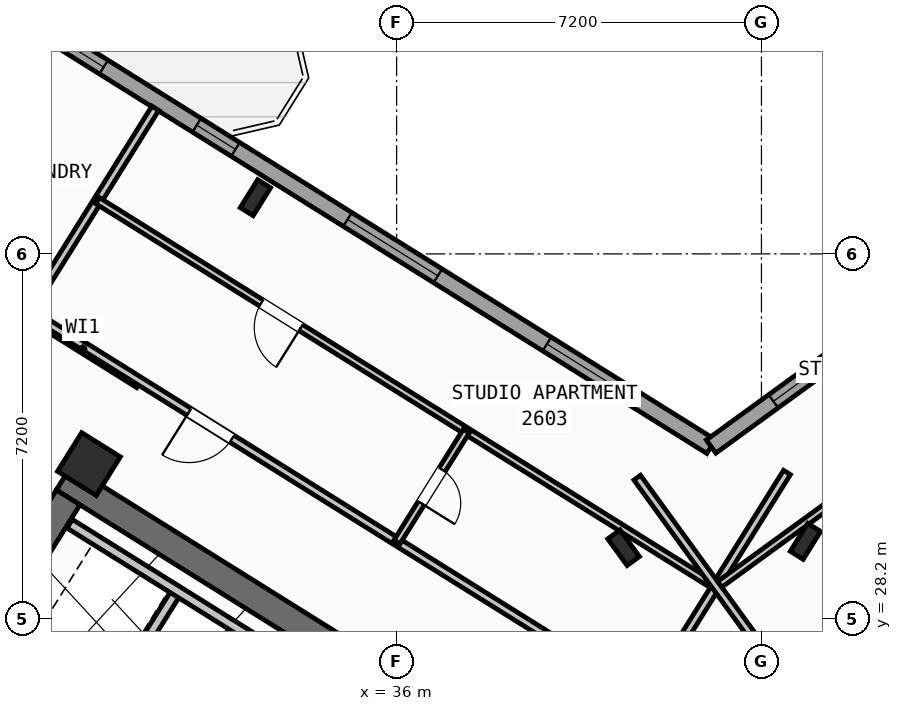
"""IFC4 building model, lengths in metres.
Left out: names, types, materials, properties, quantities, classifications, styles, units other than length and angle.
Written with IfcOpenShell. Run it as: python <this file> out.ifc"""

import sys

from ifc_helpers import new_model, si_unit, direction, frame, frame_2d, origin, origin_2d, place, context, subcontext, project, spatial, rectangle, hollow_rectangle, i_section, extrude, source, transform, mapped, element, fill, save


model = new_model("IFC4")
c1 = context("Model", 3, precision=1e-05, world=origin(), true_north=direction((0.0, 1.0)))
c2 = subcontext(c1, "Body", "Model", "MODEL_VIEW")
j1 = project(units=[si_unit("LENGTHUNIT", "METRE"), si_unit("PLANEANGLEUNIT", "RADIAN")], contexts=[c1])
p1 = place(None, origin())
s1 = spatial("IfcSite", under=j1, at=p1, CompositionType="ELEMENT")
p2 = place(p1, origin())
s2 = spatial("IfcBuilding", under=s1, at=p2, CompositionType="ELEMENT")
p3 = place(p2, frame((0.0, 0.0, 105.3)))
s3 = spatial("IfcBuildingStorey", under=s2, at=p3, CompositionType="ELEMENT", Elevation=105.3)
p4 = place(p3, frame((40.573, 24.01, 0.0), z_axis=(0.0, 0.0, 1.0), x_axis=(-0.848047359947, 0.529920442413, 0.0)))
e1 = element("IfcWall", 1, at=p4, inside=s3, PredefinedType="SHEAR", context=c2, shape_type="SweptSolid", body=[
    extrude(rectangle(XDim=13.14, YDim=0.55, at=frame_2d((6.57, 0.0))), origin(), (0.0, 0.0, 1.0), 3.35),
])
p5 = place(p3, frame((29.517, 30.594, 0.0), z_axis=(0.0, 0.0, 1.0), x_axis=(-0.529906864564, -0.848055844204, 0.0)))
e2 = element("IfcWall", 2, at=p5, inside=s3, PredefinedType="SHEAR", context=c2, shape_type="SweptSolid", body=[
    extrude(rectangle(XDim=3.575, YDim=0.55, at=frame_2d((1.788, 0.0))), origin(), (0.0, 0.0, 1.0), 3.35),
])
p6 = place(p3, frame((44.365, 24.142, 0.0), z_axis=(0.0, 0.0, 1.0), x_axis=(0.809024304885, 0.587775190107, 0.0)))
e3 = element("IfcWall", 3, at=p6, inside=s3, PredefinedType="SHEAR", context=c2, shape_type="SweptSolid", body=[
    extrude(rectangle(XDim=12.34, YDim=0.55, at=frame_2d((6.17, 0.0))), origin(), (0.0, 0.0, 1.0), 3.35),
])
m1 = source(origin(), c2, "Body", "SweptSolid", [
    extrude(i_section(OverallWidth=0.3, OverallDepth=0.65, WebThickness=0.016, FlangeThickness=0.031, at=origin_2d()), origin(), (0.0, 0.0, 1.0), 3.6),
])
for number, where, z_axis, x_axis in (
    (4, (44.068, 29.726, 0.0), (0.0, 0.0, 1.0), (-0.848, 0.53, 0.0)),
    (5, (33.213, 36.509, 0.0), (0.0, 0.0, 1.0), (-0.848, 0.53, 0.0)),
):
    element("IfcColumn", number, at=place(p3, frame(where, z_axis=z_axis, x_axis=x_axis)), inside=s3, PredefinedType="COLUMN", context=c2, shape_type="MappedRepresentation", body=[
        mapped(m1, transform((0.0, 0.0, 0.0), scale=1.0)),
    ])
m2 = source(origin(), c2, "Body", "SweptSolid", [
    extrude(hollow_rectangle(XDim=0.9, YDim=0.9, WallThickness=0.036, at=origin_2d()), origin(), (0.0, 0.0, 1.0), 3.6),
])
p7 = place(p3, frame((29.928, 31.251, 0.0), z_axis=(0.0, 0.0, 1.0), x_axis=(-0.848048096156, 0.529919264233, 0.0)))
e6 = element("IfcColumn", 6, at=p7, inside=s3, PredefinedType="COLUMN", context=c2, shape_type="MappedRepresentation", body=[
    mapped(m2, transform((0.0, 0.0, 0.0), scale=1.0)),
])
p8 = place(p3, frame((40.479, 29.601, 0.0), z_axis=(0.0, 0.0, 1.0), x_axis=(0.809016994375, 0.587785252292, 0.0)))
e7 = element("IfcColumn", 7, at=p8, inside=s3, PredefinedType="COLUMN", context=c2, shape_type="MappedRepresentation", body=[
    mapped(m1, transform((0.0, 0.0, 0.0), scale=1.0)),
])
p9 = place(p3, frame((31.76, 12.183, 0.0), z_axis=(0.0, 0.0, 1.0), x_axis=(-0.848047074256, 0.529920899612, 0.0)))
e8 = element("IfcWall", 8, at=p9, inside=s3, PredefinedType="STANDARD", context=c2, shape_type="SweptSolid", body=[
    extrude(rectangle(XDim=30.652, YDim=0.32, at=frame_2d((15.326, 0.0))), origin(), (0.0, 0.0, 1.0), 3.35),
])
p10 = place(p9, frame((15.153, 0.0, 0.0)))
e9 = element("IfcOpeningElement", 9, at=p10, cuts=e8, PredefinedType="OPENING", context=c2, shape_type="SweptSolid", body=[
    extrude(rectangle(XDim=1.2, YDim=2.15, at=frame_2d((0.6, 1.075))), frame((0.0, 0.17, 0.0), z_axis=(0.0, -1.0, 0.0), x_axis=(1.0, 0.0, 0.0)), (0.0, 0.0, 1.0), 0.34),
])
p11 = place(p9, frame((2.002, 0.0, 0.8)))
e10 = element("IfcOpeningElement", 10, at=p11, cuts=e8, PredefinedType="OPENING", context=c2, shape_type="SweptSolid", body=[
    extrude(rectangle(XDim=2.1, YDim=1.55, at=frame_2d((1.05, 0.775))), frame((0.0, 0.17, 0.0), z_axis=(0.0, -1.0, 0.0), x_axis=(1.0, 0.0, 0.0)), (0.0, 0.0, 1.0), 0.34),
])
p12 = place(p9, frame((7.206, 0.0, 0.8)))
e11 = element("IfcOpeningElement", 11, at=p12, cuts=e8, PredefinedType="OPENING", context=c2, shape_type="SweptSolid", body=[
    extrude(rectangle(XDim=2.1, YDim=1.55, at=frame_2d((1.05, 0.775))), frame((0.0, 0.17, 0.0), z_axis=(0.0, -1.0, 0.0), x_axis=(1.0, 0.0, 0.0)), (0.0, 0.0, 1.0), 0.34),
])
p13 = place(p9, frame((12.648, 0.0, 1.0)))
e12 = element("IfcOpeningElement", 12, at=p13, cuts=e8, PredefinedType="OPENING", context=c2, shape_type="SweptSolid", body=[
    extrude(rectangle(XDim=0.9, YDim=1.25, at=frame_2d((0.45, 0.625))), frame((0.0, 0.17, 0.0), z_axis=(0.0, -1.0, 0.0), x_axis=(1.0, 0.0, 0.0)), (0.0, 0.0, 1.0), 0.34),
])
p14 = place(p9, frame((20.628, 0.0, 0.95)))
e13 = element("IfcOpeningElement", 13, at=p14, cuts=e8, PredefinedType="OPENING", context=c2, shape_type="SweptSolid", body=[
    extrude(rectangle(XDim=1.2, YDim=1.4, at=frame_2d((0.6, 0.7))), frame((0.0, 0.17, 0.0), z_axis=(0.0, -1.0, 0.0), x_axis=(1.0, 0.0, 0.0)), (0.0, 0.0, 1.0), 0.34),
])
p15 = place(p9, frame((26.008, 0.0, 1.0)))
e14 = element("IfcOpeningElement", 14, at=p15, cuts=e8, PredefinedType="OPENING", context=c2, shape_type="SweptSolid", body=[
    extrude(rectangle(XDim=0.9, YDim=1.25, at=frame_2d((0.45, 0.625))), frame((0.0, 0.17, 0.0), z_axis=(0.0, -1.0, 0.0), x_axis=(1.0, 0.0, 0.0)), (0.0, 0.0, 1.0), 0.34),
])
p16 = place(p9, frame((28.408, 0.0, 1.0)))
e15 = element("IfcOpeningElement", 15, at=p16, cuts=e8, PredefinedType="OPENING", context=c2, shape_type="SweptSolid", body=[
    extrude(rectangle(XDim=0.9, YDim=1.25, at=frame_2d((0.45, 0.625))), frame((0.0, 0.17, 0.0), z_axis=(0.0, -1.0, 0.0), x_axis=(1.0, 0.0, 0.0)), (0.0, 0.0, 1.0), 0.34),
])
p17 = place(p3, frame((17.424, 47.083, 0.0), z_axis=(0.0, 0.0, 1.0), x_axis=(0.848049927979, -0.529916332693, 0.0)))
e16 = element("IfcWall", 16, at=p17, inside=s3, PredefinedType="STANDARD", context=c2, shape_type="SweptSolid", body=[
    extrude(rectangle(XDim=29.223, YDim=0.32, at=frame_2d((14.612, 0.0))), origin(), (0.0, 0.0, 1.0), 3.35),
])
p18 = place(p17, frame((3.709, 0.0, 0.0)))
e17 = element("IfcOpeningElement", 17, at=p18, cuts=e16, PredefinedType="OPENING", context=c2, shape_type="SweptSolid", body=[
    extrude(rectangle(XDim=1.05, YDim=2.15, at=frame_2d((0.525, 1.075))), frame((0.0, 0.17, 0.0), z_axis=(0.0, -1.0, 0.0), x_axis=(1.0, 0.0, 0.0)), (0.0, 0.0, 1.0), 0.34),
])
p19 = place(p17, frame((0.659, 0.0, 0.95)))
e18 = element("IfcOpeningElement", 18, at=p19, cuts=e16, PredefinedType="OPENING", context=c2, shape_type="SweptSolid", body=[
    extrude(rectangle(XDim=1.2, YDim=1.4, at=frame_2d((0.6, 0.7))), frame((0.0, 0.17, 0.0), z_axis=(0.0, -1.0, 0.0), x_axis=(1.0, 0.0, 0.0)), (0.0, 0.0, 1.0), 0.34),
])
p20 = place(p17, frame((6.972, 0.0, 1.0)))
e19 = element("IfcOpeningElement", 19, at=p20, cuts=e16, PredefinedType="OPENING", context=c2, shape_type="SweptSolid", body=[
    extrude(rectangle(XDim=0.9, YDim=1.25, at=frame_2d((0.45, 0.625))), frame((0.0, 0.17, 0.0), z_axis=(0.0, -1.0, 0.0), x_axis=(1.0, 0.0, 0.0)), (0.0, 0.0, 1.0), 0.34),
])
p21 = place(p17, frame((9.847, 0.0, 0.85)))
e20 = element("IfcOpeningElement", 20, at=p21, cuts=e16, PredefinedType="OPENING", context=c2, shape_type="SweptSolid", body=[
    extrude(rectangle(XDim=1.5, YDim=1.5, at=frame_2d((0.75, 0.75))), frame((0.0, 0.17, 0.0), z_axis=(0.0, -1.0, 0.0), x_axis=(1.0, 0.0, 0.0)), (0.0, 0.0, 1.0), 0.34),
])
p22 = place(p17, frame((13.889, 0.0, 0.95)))
e21 = element("IfcOpeningElement", 21, at=p22, cuts=e16, PredefinedType="OPENING", context=c2, shape_type="SweptSolid", body=[
    extrude(rectangle(XDim=1.2, YDim=1.4, at=frame_2d((0.6, 0.7))), frame((0.0, 0.17, 0.0), z_axis=(0.0, -1.0, 0.0), x_axis=(1.0, 0.0, 0.0)), (0.0, 0.0, 1.0), 0.34),
])
p23 = place(p17, frame((17.254, 0.0, 1.0)))
e22 = element("IfcOpeningElement", 22, at=p23, cuts=e16, PredefinedType="OPENING", context=c2, shape_type="SweptSolid", body=[
    extrude(rectangle(XDim=0.9, YDim=1.25, at=frame_2d((0.45, 0.625))), frame((0.0, 0.17, 0.0), z_axis=(0.0, -1.0, 0.0), x_axis=(1.0, 0.0, 0.0)), (0.0, 0.0, 1.0), 0.34),
])
p24 = place(p17, frame((20.764, 0.0, 0.8)))
e23 = element("IfcOpeningElement", 23, at=p24, cuts=e16, PredefinedType="OPENING", context=c2, shape_type="SweptSolid", body=[
    extrude(rectangle(XDim=2.1, YDim=1.55, at=frame_2d((1.05, 0.775))), frame((0.0, 0.17, 0.0), z_axis=(0.0, -1.0, 0.0), x_axis=(1.0, 0.0, 0.0)), (0.0, 0.0, 1.0), 0.34),
])
p25 = place(p17, frame((25.403, 0.0, 0.8)))
e24 = element("IfcOpeningElement", 24, at=p25, cuts=e16, PredefinedType="OPENING", context=c2, shape_type="SweptSolid", body=[
    extrude(rectangle(XDim=2.1, YDim=1.55, at=frame_2d((1.05, 0.775))), frame((0.0, 0.17, 0.0), z_axis=(0.0, -1.0, 0.0), x_axis=(1.0, 0.0, 0.0)), (0.0, 0.0, 1.0), 0.34),
])
p26 = place(p3, frame((42.207, 31.597, 0.0), z_axis=(0.0, 0.0, 1.0), x_axis=(0.809020333377, 0.587780656523, 0.0)))
e25 = element("IfcWall", 25, at=p26, inside=s3, PredefinedType="STANDARD", context=c2, shape_type="SweptSolid", body=[
    extrude(rectangle(XDim=15.223, YDim=0.32, at=frame_2d((7.611, 0.0))), origin(), (0.0, 0.0, 1.0), 3.35),
])
p27 = place(p26, frame((12.82, 0.0, 0.0)))
e26 = element("IfcOpeningElement", 26, at=p27, cuts=e25, PredefinedType="OPENING", context=c2, shape_type="SweptSolid", body=[
    extrude(rectangle(XDim=1.05, YDim=2.15, at=frame_2d((0.525, 1.075))), frame((0.0, 0.17, 0.0), z_axis=(0.0, -1.0, 0.0), x_axis=(1.0, 0.0, 0.0)), (0.0, 0.0, 1.0), 0.34),
])
p28 = place(p26, frame((1.52, 0.0, 0.8)))
e27 = element("IfcOpeningElement", 27, at=p28, cuts=e25, PredefinedType="OPENING", context=c2, shape_type="SweptSolid", body=[
    extrude(rectangle(XDim=2.1, YDim=1.55, at=frame_2d((1.05, 0.775))), frame((0.0, 0.17, 0.0), z_axis=(0.0, -1.0, 0.0), x_axis=(1.0, 0.0, 0.0)), (0.0, 0.0, 1.0), 0.34),
])
p29 = place(p26, frame((5.76, 0.0, 0.8)))
e28 = element("IfcOpeningElement", 28, at=p29, cuts=e25, PredefinedType="OPENING", context=c2, shape_type="SweptSolid", body=[
    extrude(rectangle(XDim=2.1, YDim=1.55, at=frame_2d((1.05, 0.775))), frame((0.0, 0.17, 0.0), z_axis=(0.0, -1.0, 0.0), x_axis=(1.0, 0.0, 0.0)), (0.0, 0.0, 1.0), 0.34),
])
p30 = place(p26, frame((10.219, 0.0, 1.0)))
e29 = element("IfcOpeningElement", 29, at=p30, cuts=e25, PredefinedType="OPENING", context=c2, shape_type="SweptSolid", body=[
    extrude(rectangle(XDim=0.9, YDim=1.25, at=frame_2d((0.45, 0.625))), frame((0.0, 0.17, 0.0), z_axis=(0.0, -1.0, 0.0), x_axis=(1.0, 0.0, 0.0)), (0.0, 0.0, 1.0), 0.34),
])
p31 = place(p3, frame((31.645, 28.716, 0.0), z_axis=(0.0, 0.0, 1.0), x_axis=(-0.52986693015, -0.848080795876, 0.0)))
e30 = element("IfcWall", 30, at=p31, inside=s3, PredefinedType="STANDARD", context=c2, shape_type="SweptSolid", body=[
    extrude(rectangle(XDim=2.66, YDim=0.2, at=frame_2d((1.33, 0.0))), origin(), (0.0, 0.0, 1.0), 3.34),
])
p32 = place(p3, frame((33.363, 27.69, 0.0), z_axis=(0.0, 0.0, 1.0), x_axis=(-0.848047090064, 0.529920874315, 0.0)))
e31 = element("IfcWall", 31, at=p32, inside=s3, PredefinedType="STANDARD", context=c2, shape_type="SweptSolid", body=[
    extrude(rectangle(XDim=4.498, YDim=0.2, at=frame_2d((2.249, 0.0))), origin(), (0.0, 0.0, 1.0), 3.34),
])
p33 = place(p3, frame((30.914, 32.829, 0.0), z_axis=(0.0, 0.0, 1.0), x_axis=(-0.848008813643, 0.529982124211, 0.0)))
e32 = element("IfcWall", 32, at=p33, inside=s3, PredefinedType="PARTITIONING", context=c2, shape_type="SweptSolid", body=[
    extrude(rectangle(XDim=2.61, YDim=0.16, at=frame_2d((1.305, 0.0))), origin(), (0.0, 0.0, 1.0), 3.34),
])
p34 = place(p3, frame((31.239, 38.274, 0.0), z_axis=(0.0, 0.0, 1.0), x_axis=(-0.529918119251, -0.84804881162, 0.0)))
e33 = element("IfcWall", 33, at=p34, inside=s3, PredefinedType="PARTITIONING", context=c2, shape_type="SweptSolid", body=[
    extrude(rectangle(XDim=17.65, YDim=0.16, at=frame_2d((8.825, 0.0))), origin(), (0.0, 0.0, 1.0), 3.34),
])
p35 = place(p3, frame((41.936, 26.012, 0.0), z_axis=(0.0, 0.0, 1.0), x_axis=(-0.848051154596, 0.529914369676, 0.0)))
e34 = element("IfcWall", 34, at=p35, inside=s3, PredefinedType="PARTITIONING", context=c2, shape_type="SweptSolid", body=[
    extrude(rectangle(XDim=15.57, YDim=0.16, at=frame_2d((7.785, 0.0))), origin(), (0.0, 0.0, 1.0), 3.34),
])
p36 = place(p35, frame((10.83, 0.0, 0.0)))
e35 = element("IfcOpeningElement", 35, at=p36, cuts=e34, PredefinedType="OPENING", context=c2, shape_type="SweptSolid", body=[
    extrude(rectangle(XDim=1.0, YDim=2.1, at=frame_2d((0.5, 1.05))), frame((0.0, 0.09, 0.0), z_axis=(0.0, -1.0, 0.0), x_axis=(1.0, 0.0, 0.0)), (0.0, 0.0, 1.0), 0.18),
])
p37 = place(p3, frame((43.704, 31.086, 0.0), z_axis=(0.0, 0.0, 1.0), x_axis=(-0.529906828443, -0.848055866774, 0.0)))
e36 = element("IfcWall", 36, at=p37, inside=s3, PredefinedType="PARTITIONING", context=c2, shape_type="SweptSolid", body=[
    extrude(rectangle(XDim=5.48, YDim=0.16, at=frame_2d((2.74, 0.0))), origin(), (0.0, 0.0, 1.0), 3.34),
])
p38 = place(p3, frame((42.226, 28.873, 0.0), z_axis=(0.0, 0.0, 1.0), x_axis=(-0.848049134363, 0.529917602752, 0.0)))
e37 = element("IfcWall", 37, at=p38, inside=s3, PredefinedType="PLUMBINGWALL", context=c2, shape_type="SweptSolid", body=[
    extrude(rectangle(XDim=14.3, YDim=0.14, at=frame_2d((7.15, 0.0))), origin(), (0.0, 0.0, 1.0), 3.34),
])
p39 = place(p38, frame((9.57, 0.0, 0.0)))
e38 = element("IfcOpeningElement", 38, at=p39, cuts=e37, PredefinedType="OPENING", context=c2, shape_type="SweptSolid", body=[
    extrude(rectangle(XDim=0.92, YDim=2.08, at=frame_2d((0.46, 1.04))), frame((0.0, 0.08, 0.0), z_axis=(0.0, -1.0, 0.0), x_axis=(1.0, 0.0, 0.0)), (0.0, 0.0, 1.0), 0.16),
])
p40 = place(p3, frame((37.375, 31.904, 0.0), z_axis=(0.0, 0.0, 1.0), x_axis=(-0.529913878929, -0.848051461244, 0.0)))
e39 = element("IfcWall", 39, at=p40, inside=s3, PredefinedType="PLUMBINGWALL", context=c2, shape_type="SweptSolid", body=[
    extrude(rectangle(XDim=2.58, YDim=0.14, at=frame_2d((1.29, 0.0))), origin(), (0.0, 0.0, 1.0), 3.34),
])
p41 = place(p40, frame((0.9, 0.0, 0.0)))
e40 = element("IfcOpeningElement", 40, at=p41, cuts=e39, PredefinedType="OPENING", context=c2, shape_type="SweptSolid", body=[
    extrude(rectangle(XDim=0.78, YDim=2.05, at=frame_2d((0.39, 1.025))), frame((0.0, 0.08, 0.0), z_axis=(0.0, -1.0, 0.0), x_axis=(1.0, 0.0, 0.0)), (0.0, 0.0, 1.0), 0.16),
])
p42 = place(p3, frame((42.866, 26.044, 0.0), z_axis=(0.0, 0.0, 1.0), x_axis=(0.809020254154, 0.587780765566, 0.0)))
e41 = element("IfcWall", 41, at=p42, inside=s3, PredefinedType="PARTITIONING", context=c2, shape_type="SweptSolid", body=[
    extrude(rectangle(XDim=14.67, YDim=0.16, at=frame_2d((7.335, 0.0))), origin(), (0.0, 0.0, 1.0), 3.34),
])
p43 = place(p42, frame((10.2, 0.0, 0.0)))
e42 = element("IfcOpeningElement", 42, at=p43, cuts=e41, PredefinedType="OPENING", context=c2, shape_type="SweptSolid", body=[
    extrude(rectangle(XDim=1.0, YDim=2.1, at=frame_2d((0.5, 1.05))), frame((0.0, 0.09, 0.0), z_axis=(0.0, -1.0, 0.0), x_axis=(1.0, 0.0, 0.0)), (0.0, 0.0, 1.0), 0.18),
])
p44 = place(p3, frame((43.969, 26.55, 0.0), z_axis=(0.0, 0.0, 1.0), x_axis=(-0.587776919386, 0.80902304852, 0.0)))
e43 = element("IfcWall", 43, at=p44, inside=s3, PredefinedType="PARTITIONING", context=c2, shape_type="SweptSolid", body=[
    extrude(rectangle(XDim=5.48, YDim=0.16, at=frame_2d((2.74, 0.0))), origin(), (0.0, 0.0, 1.0), 3.34),
])
p45 = place(p3, frame((42.377, 28.878, 0.0), z_axis=(0.0, 0.0, 1.0), x_axis=(0.809020411523, 0.587780548963, 0.0)))
e44 = element("IfcWall", 44, at=p45, inside=s3, PredefinedType="PLUMBINGWALL", context=c2, shape_type="SweptSolid", body=[
    extrude(rectangle(XDim=13.4, YDim=0.14, at=frame_2d((6.7, 0.0))), origin(), (0.0, 0.0, 1.0), 3.34),
])
p46 = place(p45, frame((8.94, 0.0, 0.0)))
e45 = element("IfcOpeningElement", 45, at=p46, cuts=e44, PredefinedType="OPENING", context=c2, shape_type="SweptSolid", body=[
    extrude(rectangle(XDim=0.92, YDim=2.08, at=frame_2d((0.46, 1.04))), frame((0.0, 0.08, 0.0), z_axis=(0.0, -1.0, 0.0), x_axis=(1.0, 0.0, 0.0)), (0.0, 0.0, 1.0), 0.16),
])
m3 = source(origin(), c2, "Body", "SweptSolid", [
    extrude(rectangle(XDim=1.2, YDim=1.4, at=frame_2d((0.6, 0.7))), frame((0.0, 0.03, 0.0), z_axis=(0.0, -1.0, 0.0), x_axis=(1.0, 0.0, 0.0)), (0.0, 0.0, 1.0), 0.06),
])
p47 = place(p22, origin())
e46 = element("IfcWindow", 46, at=p47, inside=s3, PartitioningType="SINGLE_PANEL", PredefinedType="WINDOW", context=c2, shape_type="MappedRepresentation", body=[
    mapped(m3, transform((0.0, 0.0, 0.0), scale=1.0)),
])
fill(e21, e46)
m4 = source(origin(), c2, "Body", "SweptSolid", [
    extrude(rectangle(XDim=0.9, YDim=1.25, at=frame_2d((0.45, 0.625))), frame((0.0, 0.03, 0.0), z_axis=(0.0, -1.0, 0.0), x_axis=(1.0, 0.0, 0.0)), (0.0, 0.0, 1.0), 0.06),
])
p48 = place(p23, origin())
e47 = element("IfcWindow", 47, at=p48, inside=s3, PartitioningType="SINGLE_PANEL", PredefinedType="WINDOW", context=c2, shape_type="MappedRepresentation", body=[
    mapped(m4, transform((0.0, 0.0, 0.0), scale=1.0)),
])
fill(e22, e47)
m5 = source(origin(), c2, "Body", "SweptSolid", [
    extrude(rectangle(XDim=2.1, YDim=1.55, at=frame_2d((1.05, 0.775))), frame((0.0, 0.03, 0.0), z_axis=(0.0, -1.0, 0.0), x_axis=(1.0, 0.0, 0.0)), (0.0, 0.0, 1.0), 0.06),
])
p49 = place(p24, origin())
e48 = element("IfcWindow", 48, at=p49, inside=s3, PartitioningType="SINGLE_PANEL", PredefinedType="WINDOW", context=c2, shape_type="MappedRepresentation", body=[
    mapped(m5, transform((0.0, 0.0, 0.0), scale=1.0)),
])
fill(e23, e48)
p50 = place(p25, origin())
e49 = element("IfcWindow", 49, at=p50, inside=s3, PartitioningType="SINGLE_PANEL", PredefinedType="WINDOW", context=c2, shape_type="MappedRepresentation", body=[
    mapped(m5, transform((0.0, 0.0, 0.0), scale=1.0)),
])
fill(e24, e49)
p51 = place(p28, origin())
e50 = element("IfcWindow", 50, at=p51, inside=s3, PartitioningType="SINGLE_PANEL", PredefinedType="WINDOW", context=c2, shape_type="MappedRepresentation", body=[
    mapped(m5, transform((0.0, 0.0, 0.0), scale=1.0)),
])
fill(e27, e50)
m6 = source(origin(), c2, "Body", "SweptSolid", [
    extrude(rectangle(XDim=1.0, YDim=2.1, at=frame_2d((0.5, 1.05))), frame((0.0, 0.025, 0.0), z_axis=(0.0, -1.0, 0.0), x_axis=(1.0, 0.0, 0.0)), (0.0, 0.0, 1.0), 0.05),
])
p52 = place(p36, origin())
e51 = element("IfcDoor", 51, at=p52, inside=s3, OperationType="SINGLE_SWING_RIGHT", PredefinedType="DOOR", context=c2, shape_type="MappedRepresentation", body=[
    mapped(m6, transform((0.0, 0.0, 0.0), scale=1.0)),
])
fill(e35, e51)
m7 = source(origin(), c2, "Body", "SweptSolid", [
    extrude(rectangle(XDim=0.92, YDim=2.08, at=frame_2d((0.46, 1.04))), frame((0.0, 0.025, 0.0), z_axis=(0.0, -1.0, 0.0), x_axis=(1.0, 0.0, 0.0)), (0.0, 0.0, 1.0), 0.05),
])
p53 = place(p39, origin())
e52 = element("IfcDoor", 52, at=p53, inside=s3, OperationType="SINGLE_SWING_LEFT", PredefinedType="DOOR", context=c2, shape_type="MappedRepresentation", body=[
    mapped(m7, transform((0.0, 0.0, 0.0), scale=1.0)),
])
fill(e38, e52)
m8 = source(origin(), c2, "Body", "SweptSolid", [
    extrude(rectangle(XDim=0.78, YDim=2.05, at=frame_2d((0.39, 1.025))), frame((0.0, 0.025, 0.0), z_axis=(0.0, -1.0, 0.0), x_axis=(1.0, 0.0, 0.0)), (0.0, 0.0, 1.0), 0.05),
])
p54 = place(p41, origin())
e53 = element("IfcDoor", 53, at=p54, inside=s3, OperationType="SINGLE_SWING_RIGHT", PredefinedType="DOOR", context=c2, shape_type="MappedRepresentation", body=[
    mapped(m8, transform((0.0, 0.0, 0.0), scale=1.0)),
])
fill(e40, e53)
save(model, sys.argv[1])
